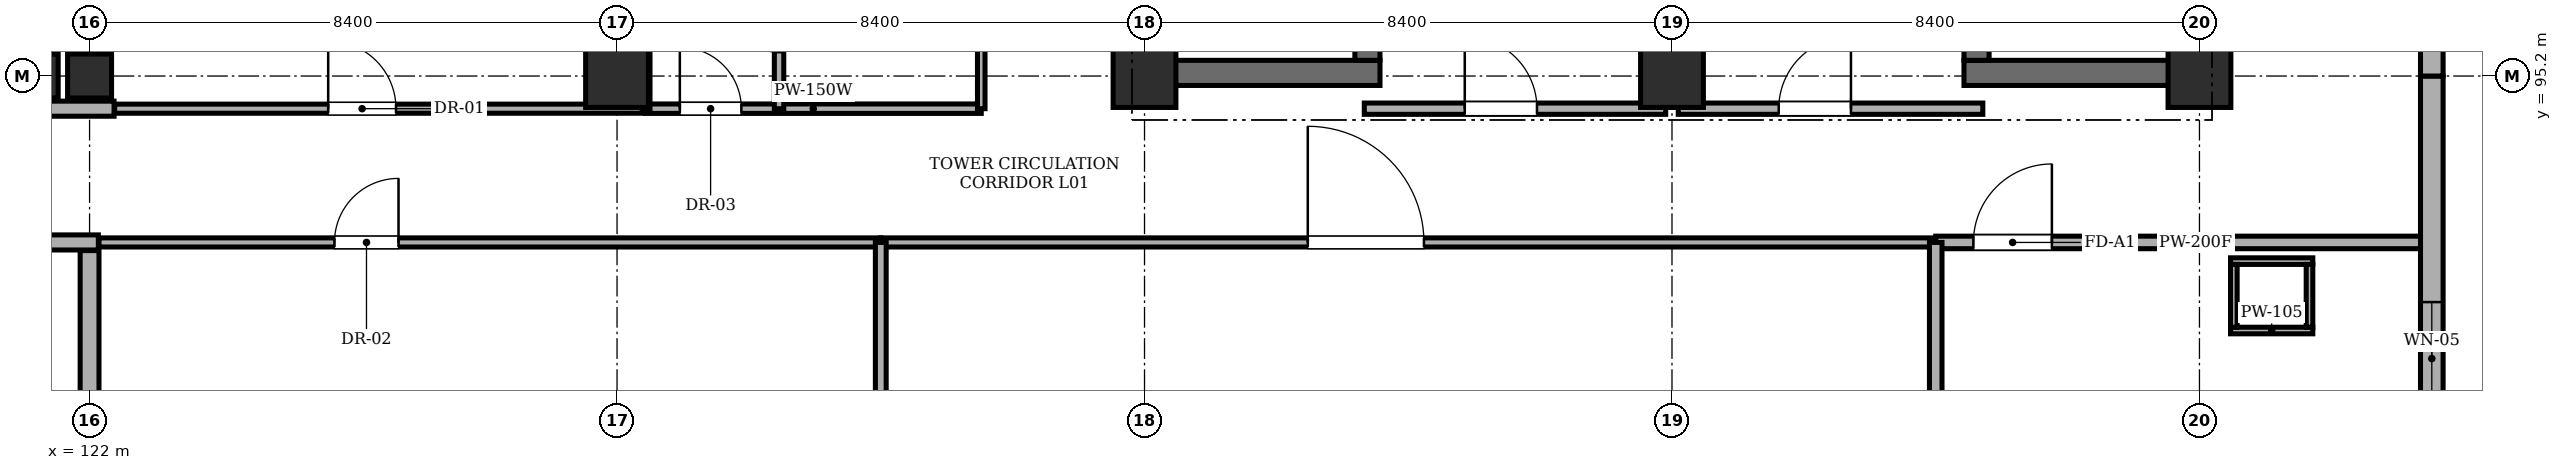
"""IFC4 building model, lengths in metres.
Left out: names, types, materials, properties, quantities, classifications, styles, units other than length and angle.
Written with IfcOpenShell. Run it as: python <this file> out.ifc"""

import sys

from ifc_helpers import new_model, si_unit, direction, frame, frame_2d, origin, origin_2d, place, context, subcontext, project, spatial, rectangle, extrude, element, fill, save


model = new_model("IFC4")
c1 = context("Model", 3, precision=1e-05, world=origin(), true_north=direction((0.0, 1.0)))
c2 = subcontext(c1, "Body", "Model", "MODEL_VIEW")
j1 = project(units=[si_unit("LENGTHUNIT", "METRE"), si_unit("PLANEANGLEUNIT", "RADIAN")], contexts=[c1])
p1 = place(None, origin())
s1 = spatial("IfcSite", under=j1, at=p1, CompositionType="ELEMENT")
p2 = place(p1, origin())
s2 = spatial("IfcBuilding", under=s1, at=p2, CompositionType="ELEMENT")
p3 = place(p2, origin())
s3 = spatial("IfcBuildingStorey", under=s2, at=p3, CompositionType="ELEMENT", Elevation=0.0)
for number, where, z_axis, x_axis in (
    (1, (121.15, 95.2, 0.0), (0.0, 0.0, 1.0), (1.0, 0.0, 0.0)),
    (2, (122.0, 95.2, 0.0), (0.0, 0.0, 1.0), (1.0, 0.0, 0.0)),
):
    element("IfcColumn", number, at=place(p3, frame(where, z_axis=z_axis, x_axis=x_axis)), inside=s3, PredefinedType="COLUMN", context=c2, shape_type="SweptSolid", body=[
        extrude(rectangle(XDim=0.7, YDim=0.7, at=origin_2d()), origin(), (0.0, 0.0, 1.0), 5.18),
    ])
for number, where, z_axis, x_axis in (
    (3, (130.4, 95.2, 0.0), (0.0, 0.0, 1.0), (1.0, 0.0, 0.0)),
    (4, (138.8, 95.2, 0.0), (0.0, 0.0, 1.0), (1.0, 0.0, 0.0)),
    (5, (147.2, 95.2, 0.0), (0.0, 0.0, 1.0), (1.0, 0.0, 0.0)),
    (6, (155.6, 95.2, 0.0), (0.0, 0.0, 1.0), (1.0, 0.0, 0.0)),
):
    element("IfcColumn", number, at=place(p3, frame(where, z_axis=z_axis, x_axis=x_axis)), inside=s3, PredefinedType="COLUMN", context=c2, shape_type="SweptSolid", body=[
        extrude(rectangle(XDim=1.0, YDim=1.0, at=origin_2d()), origin(), (0.0, 0.0, 1.0), 5.18),
    ])
p4 = place(p3, frame((138.65, 95.25, 0.0), z_axis=(0.0, 0.0, 1.0), x_axis=(1.0, 0.0, 0.0)))
e7 = element("IfcWall", 7, at=p4, inside=s3, PredefinedType="SHEAR", context=c2, shape_type="SweptSolid", body=[
    extrude(rectangle(XDim=3.9, YDim=0.4, at=frame_2d((1.95, 0.0))), origin(), (0.0, 0.0, 1.0), 5.18),
])
p5 = place(p3, frame((138.85, 95.45, 0.0), z_axis=(0.0, 0.0, 1.0), x_axis=(0.0, 1.0, 0.0)))
e8 = element("IfcWall", 8, at=p5, inside=s3, PredefinedType="SHEAR", context=c2, shape_type="SweptSolid", body=[
    extrude(rectangle(XDim=7.9, YDim=0.4, at=frame_2d((3.95, 0.0))), origin(), (0.0, 0.0, 1.0), 5.18),
])
p6 = place(p3, frame((142.35, 95.45, 0.0), z_axis=(0.0, 0.0, 1.0), x_axis=(0.0, 1.0, 0.0)))
e9 = element("IfcWall", 9, at=p6, inside=s3, PredefinedType="SHEAR", context=c2, shape_type="SweptSolid", body=[
    extrude(rectangle(XDim=7.9, YDim=0.4, at=frame_2d((3.95, 0.0))), origin(), (0.0, 0.0, 1.0), 5.18),
])
p7 = place(p6, frame((0.22, 0.0, 0.0)))
e10 = element("IfcOpeningElement", 10, at=p7, cuts=e9, PredefinedType="OPENING", context=c2, shape_type="SweptSolid", body=[
    extrude(rectangle(XDim=1.15, YDim=2.15, at=frame_2d((0.575, 1.075))), frame((0.0, 0.21, 0.0), z_axis=(0.0, -1.0, 0.0), x_axis=(1.0, 0.0, 0.0)), (0.0, 0.0, 1.0), 0.42),
])
p8 = place(p3, frame((151.85, 95.25, 0.0), z_axis=(0.0, 0.0, 1.0), x_axis=(1.0, 0.0, 0.0)))
e11 = element("IfcWall", 11, at=p8, inside=s3, PredefinedType="SHEAR", context=c2, shape_type="SweptSolid", body=[
    extrude(rectangle(XDim=3.9, YDim=0.4, at=frame_2d((1.95, 0.0))), origin(), (0.0, 0.0, 1.0), 5.18),
])
p9 = place(p3, frame((152.05, 95.45, 0.0), z_axis=(0.0, 0.0, 1.0), x_axis=(0.0, 1.0, 0.0)))
e12 = element("IfcWall", 12, at=p9, inside=s3, PredefinedType="SHEAR", context=c2, shape_type="SweptSolid", body=[
    extrude(rectangle(XDim=7.9, YDim=0.4, at=frame_2d((3.95, 0.0))), origin(), (0.0, 0.0, 1.0), 5.18),
])
p10 = place(p9, frame((0.35, 0.0, 0.0)))
e13 = element("IfcOpeningElement", 13, at=p10, cuts=e12, PredefinedType="OPENING", context=c2, shape_type="SweptSolid", body=[
    extrude(rectangle(XDim=1.15, YDim=2.15, at=frame_2d((0.575, 1.075))), frame((0.0, 0.21, 0.0), z_axis=(0.0, -1.0, 0.0), x_axis=(1.0, 0.0, 0.0)), (0.0, 0.0, 1.0), 0.42),
])
p11 = place(p3, frame((155.55, 95.45, 0.0), z_axis=(0.0, 0.0, 1.0), x_axis=(0.0, 1.0, 0.0)))
e14 = element("IfcWall", 14, at=p11, inside=s3, PredefinedType="SHEAR", context=c2, shape_type="SweptSolid", body=[
    extrude(rectangle(XDim=7.9, YDim=0.4, at=frame_2d((3.95, 0.0))), origin(), (0.0, 0.0, 1.0), 5.18),
])
p12 = place(p3, frame((159.3, 95.2, 0.0), z_axis=(0.0, 0.0, 1.0), x_axis=(0.0, -1.0, 0.0)))
e15 = element("IfcWall", 15, at=p12, inside=s3, PredefinedType="STANDARD", context=c2, shape_type="SweptSolid", body=[
    extrude(rectangle(XDim=8.4, YDim=0.36, at=frame_2d((4.2, 0.0))), origin(), (0.0, 0.0, 1.0), 4.78),
])
p13 = place(p12, frame((3.6, 0.0, 1.1)))
e16 = element("IfcOpeningElement", 16, at=p13, cuts=e15, PredefinedType="OPENING", context=c2, shape_type="SweptSolid", body=[
    extrude(rectangle(XDim=1.8, YDim=1.8, at=frame_2d((0.9, 0.9))), frame((0.0, 0.19, 0.0), z_axis=(0.0, -1.0, 0.0), x_axis=(1.0, 0.0, 0.0)), (0.0, 0.0, 1.0), 0.38),
])
p14 = place(p3, frame((159.3, 103.6, 0.0), z_axis=(0.0, 0.0, 1.0), x_axis=(0.0, -1.0, 0.0)))
e17 = element("IfcWall", 17, at=p14, inside=s3, PredefinedType="STANDARD", context=c2, shape_type="SweptSolid", body=[
    extrude(rectangle(XDim=8.4, YDim=0.36, at=frame_2d((4.2, 0.0))), origin(), (0.0, 0.0, 1.0), 4.78),
])
p15 = place(p14, frame((1.15, 0.0, 1.1)))
e18 = element("IfcOpeningElement", 18, at=p15, cuts=e17, PredefinedType="OPENING", context=c2, shape_type="SweptSolid", body=[
    extrude(rectangle(XDim=1.4, YDim=1.4, at=frame_2d((0.7, 0.7))), frame((0.0, 0.19, 0.0), z_axis=(0.0, -1.0, 0.0), x_axis=(1.0, 0.0, 0.0)), (0.0, 0.0, 1.0), 0.38),
])
p16 = place(p3, frame((122.0, 87.15, 0.0), z_axis=(0.0, 0.0, 1.0), x_axis=(0.0, 1.0, 0.0)))
e19 = element("IfcWall", 19, at=p16, inside=s3, PredefinedType="STANDARD", context=c2, shape_type="SweptSolid", body=[
    extrude(rectangle(XDim=5.27, YDim=0.3, at=frame_2d((2.635, 0.0))), origin(), (0.0, 0.0, 1.0), 4.43),
])
p17 = place(p3, frame((122.14, 92.55, 0.0), z_axis=(0.0, 0.0, 1.0), x_axis=(-1.0, 0.0, 0.0)))
e20 = element("IfcWall", 20, at=p17, inside=s3, PredefinedType="STANDARD", context=c2, shape_type="SweptSolid", body=[
    extrude(rectangle(XDim=1.11, YDim=0.24, at=frame_2d((0.555, 0.0))), origin(), (0.0, 0.0, 1.0), 5.18),
])
p18 = place(p3, frame((121.03, 94.68, 0.0), z_axis=(0.0, 0.0, 1.0), x_axis=(1.0, 0.0, 0.0)))
e21 = element("IfcWall", 21, at=p18, inside=s3, PredefinedType="STANDARD", context=c2, shape_type="SweptSolid", body=[
    extrude(rectangle(XDim=1.36, YDim=0.24, at=frame_2d((0.68, 0.0))), origin(), (0.0, 0.0, 1.0), 5.18),
])
p19 = place(p3, frame((122.0, 95.55, 0.0), z_axis=(0.0, 0.0, 1.0), x_axis=(0.0, 1.0, 0.0)))
e22 = element("IfcWall", 22, at=p19, inside=s3, PredefinedType="STANDARD", context=c2, shape_type="SweptSolid", body=[
    extrude(rectangle(XDim=7.7, YDim=0.3, at=frame_2d((3.85, 0.0))), origin(), (0.0, 0.0, 1.0), 4.43),
])
p20 = place(p3, frame((142.3, 94.68, 0.0), z_axis=(0.0, 0.0, 1.0), x_axis=(1.0, 0.0, 0.0)))
e23 = element("IfcWall", 23, at=p20, inside=s3, PredefinedType="STANDARD", context=c2, shape_type="SweptSolid", body=[
    extrude(rectangle(XDim=4.8, YDim=0.18, at=frame_2d((2.4, 0.0))), origin(), (0.0, 0.0, 1.0), 5.18),
])
p21 = place(p20, frame((1.6, 0.0, 0.0)))
e24 = element("IfcOpeningElement", 24, at=p21, cuts=e23, PredefinedType="OPENING", context=c2, shape_type="SweptSolid", body=[
    extrude(rectangle(XDim=1.15, YDim=2.15, at=frame_2d((0.575, 1.075))), frame((0.0, 0.1, 0.0), z_axis=(0.0, -1.0, 0.0), x_axis=(1.0, 0.0, 0.0)), (0.0, 0.0, 1.0), 0.2),
])
p22 = place(p3, frame((147.3, 94.68, 0.0), z_axis=(0.0, 0.0, 1.0), x_axis=(1.0, 0.0, 0.0)))
e25 = element("IfcWall", 25, at=p22, inside=s3, PredefinedType="STANDARD", context=c2, shape_type="SweptSolid", body=[
    extrude(rectangle(XDim=4.85, YDim=0.18, at=frame_2d((2.425, 0.0))), origin(), (0.0, 0.0, 1.0), 5.18),
])
p23 = place(p22, frame((1.6, 0.0, 0.0)))
e26 = element("IfcOpeningElement", 26, at=p23, cuts=e25, PredefinedType="OPENING", context=c2, shape_type="SweptSolid", body=[
    extrude(rectangle(XDim=1.15, YDim=2.15, at=frame_2d((0.575, 1.075))), frame((0.0, 0.1, 0.0), z_axis=(0.0, -1.0, 0.0), x_axis=(1.0, 0.0, 0.0)), (0.0, 0.0, 1.0), 0.2),
])
p24 = place(p3, frame((130.85, 94.68, 0.0), z_axis=(0.0, 0.0, 1.0), x_axis=(1.0, 0.0, 0.0)))
e27 = element("IfcWall", 27, at=p24, inside=s3, PredefinedType="PARTITIONING", context=c2, shape_type="SweptSolid", body=[
    extrude(rectangle(XDim=5.35, YDim=0.15, at=frame_2d((2.675, 0.0))), origin(), (0.0, 0.0, 1.0), 5.18),
])
p25 = place(p24, frame((0.55, 0.0, 0.0)))
e28 = element("IfcOpeningElement", 28, at=p25, cuts=e27, PredefinedType="OPENING", context=c2, shape_type="SweptSolid", body=[
    extrude(rectangle(XDim=0.98, YDim=2.12, at=frame_2d((0.49, 1.06))), frame((0.0, 0.085, 0.0), z_axis=(0.0, -1.0, 0.0), x_axis=(1.0, 0.0, 0.0)), (0.0, 0.0, 1.0), 0.17),
])
p26 = place(p3, frame((132.98, 94.68, 0.0), z_axis=(0.0, 0.0, 1.0), x_axis=(0.0, 1.0, 0.0)))
e29 = element("IfcWall", 29, at=p26, inside=s3, PredefinedType="PARTITIONING", context=c2, shape_type="SweptSolid", body=[
    extrude(rectangle(XDim=8.57, YDim=0.15, at=frame_2d((4.285, 0.0))), origin(), (0.0, 0.0, 1.0), 5.18),
])
p27 = place(p26, frame((0.9, 0.0, 0.0)))
e30 = element("IfcOpeningElement", 30, at=p27, cuts=e29, PredefinedType="OPENING", context=c2, shape_type="SweptSolid", body=[
    extrude(rectangle(XDim=1.0, YDim=2.12, at=frame_2d((0.5, 1.06))), frame((0.0, 0.085, 0.0), z_axis=(0.0, -1.0, 0.0), x_axis=(1.0, 0.0, 0.0)), (0.0, 0.0, 1.0), 0.17),
])
p28 = place(p26, frame((3.7, 0.0, 0.0)))
e31 = element("IfcOpeningElement", 31, at=p28, cuts=e29, PredefinedType="OPENING", context=c2, shape_type="SweptSolid", body=[
    extrude(rectangle(XDim=0.92, YDim=2.1, at=frame_2d((0.46, 1.05))), frame((0.0, 0.085, 0.0), z_axis=(0.0, -1.0, 0.0), x_axis=(1.0, 0.0, 0.0)), (0.0, 0.0, 1.0), 0.17),
])
p29 = place(p26, frame((6.5, 0.0, 0.0)))
e32 = element("IfcOpeningElement", 32, at=p29, cuts=e29, PredefinedType="OPENING", context=c2, shape_type="SweptSolid", body=[
    extrude(rectangle(XDim=0.92, YDim=2.1, at=frame_2d((0.46, 1.05))), frame((0.0, 0.085, 0.0), z_axis=(0.0, -1.0, 0.0), x_axis=(1.0, 0.0, 0.0)), (0.0, 0.0, 1.0), 0.17),
])
p30 = place(p3, frame((130.85, 94.68, 0.0), z_axis=(0.0, 0.0, 1.0), x_axis=(0.0, 1.0, 0.0)))
e33 = element("IfcWall", 33, at=p30, inside=s3, PredefinedType="PARTITIONING", context=c2, shape_type="SweptSolid", body=[
    extrude(rectangle(XDim=8.57, YDim=0.15, at=frame_2d((4.285, 0.0))), origin(), (0.0, 0.0, 1.0), 5.18),
])
p31 = place(p3, frame((136.2, 94.68, 0.0), z_axis=(0.0, 0.0, 1.0), x_axis=(0.0, 1.0, 0.0)))
e34 = element("IfcWall", 34, at=p31, inside=s3, PredefinedType="PARTITIONING", context=c2, shape_type="SweptSolid", body=[
    extrude(rectangle(XDim=9.07, YDim=0.12, at=frame_2d((4.535, 0.0))), origin(), (0.0, 0.0, 1.0), 5.18),
])
p32 = place(p3, frame((122.4, 94.68, 0.0), z_axis=(0.0, 0.0, 1.0), x_axis=(1.0, 0.0, 0.0)))
e35 = element("IfcWall", 35, at=p32, inside=s3, PredefinedType="PARTITIONING", context=c2, shape_type="SweptSolid", body=[
    extrude(rectangle(XDim=8.4, YDim=0.145, at=frame_2d((4.2, 0.0))), origin(), (0.0, 0.0, 1.0), 5.18),
])
p33 = place(p32, frame((3.4, 0.0, 0.0)))
e36 = element("IfcOpeningElement", 36, at=p33, cuts=e35, PredefinedType="OPENING", context=c2, shape_type="SweptSolid", body=[
    extrude(rectangle(XDim=1.08, YDim=2.15, at=frame_2d((0.54, 1.075))), frame((0.0, 0.083, 0.0), z_axis=(0.0, -1.0, 0.0), x_axis=(1.0, 0.0, 0.0)), (0.0, 0.0, 1.0), 0.165),
])
p34 = place(p3, frame((122.15, 92.55, 0.0), z_axis=(0.0, 0.0, 1.0), x_axis=(1.0, 0.0, 0.0)))
e37 = element("IfcWall", 37, at=p34, inside=s3, PredefinedType="PARTITIONING", context=c2, shape_type="SweptSolid", body=[
    extrude(rectangle(XDim=12.45, YDim=0.145, at=frame_2d((6.225, 0.0))), origin(), (0.0, 0.0, 1.0), 5.18),
])
p35 = place(p34, frame((3.75, 0.0, 0.0)))
e38 = element("IfcOpeningElement", 38, at=p35, cuts=e37, PredefinedType="OPENING", context=c2, shape_type="SweptSolid", body=[
    extrude(rectangle(XDim=1.02, YDim=2.15, at=frame_2d((0.51, 1.075))), frame((0.0, 0.083, 0.0), z_axis=(0.0, -1.0, 0.0), x_axis=(1.0, 0.0, 0.0)), (0.0, 0.0, 1.0), 0.165),
])
p36 = place(p3, frame((134.6, 92.55, 0.0), z_axis=(0.0, 0.0, 1.0), x_axis=(1.0, 0.0, 0.0)))
e39 = element("IfcWall", 39, at=p36, inside=s3, PredefinedType="PARTITIONING", context=c2, shape_type="SweptSolid", body=[
    extrude(rectangle(XDim=16.8, YDim=0.145, at=frame_2d((8.4, 0.0))), origin(), (0.0, 0.0, 1.0), 5.18),
])
p37 = place(p36, frame((6.8, 0.0, 0.0)))
e40 = element("IfcOpeningElement", 40, at=p37, cuts=e39, PredefinedType="OPENING", context=c2, shape_type="SweptSolid", body=[
    extrude(rectangle(XDim=1.85, YDim=2.25, at=frame_2d((0.925, 1.125))), frame((0.0, 0.083, 0.0), z_axis=(0.0, -1.0, 0.0), x_axis=(1.0, 0.0, 0.0)), (0.0, 0.0, 1.0), 0.165),
])
p38 = place(p3, frame((134.6, 78.55, 0.0), z_axis=(0.0, 0.0, 1.0), x_axis=(0.0, 1.0, 0.0)))
e41 = element("IfcWall", 41, at=p38, inside=s3, PredefinedType="PARTITIONING", context=c2, shape_type="SweptSolid", body=[
    extrude(rectangle(XDim=14.0, YDim=0.172, at=frame_2d((7.0, 0.0))), origin(), (0.0, 0.0, 1.0), 4.63),
])
p39 = place(p3, frame((151.4, 92.55, 0.0), z_axis=(0.0, 0.0, 1.0), x_axis=(1.0, 0.0, 0.0)))
e42 = element("IfcWall", 42, at=p39, inside=s3, PredefinedType="SOLIDWALL", context=c2, shape_type="SweptSolid", body=[
    extrude(rectangle(XDim=7.72, YDim=0.2, at=frame_2d((3.86, 0.0))), origin(), (0.0, 0.0, 1.0), 5.18),
])
p40 = place(p39, frame((0.6, 0.0, 0.0)))
e43 = element("IfcOpeningElement", 43, at=p40, cuts=e42, PredefinedType="OPENING", context=c2, shape_type="SweptSolid", body=[
    extrude(rectangle(XDim=1.25, YDim=2.2, at=frame_2d((0.625, 1.1))), frame((0.0, 0.11, 0.0), z_axis=(0.0, -1.0, 0.0), x_axis=(1.0, 0.0, 0.0)), (0.0, 0.0, 1.0), 0.22),
])
p41 = place(p3, frame((151.4, 78.55, 0.0), z_axis=(0.0, 0.0, 1.0), x_axis=(0.0, 1.0, 0.0)))
e44 = element("IfcWall", 44, at=p41, inside=s3, PredefinedType="SOLIDWALL", context=c2, shape_type="SweptSolid", body=[
    extrude(rectangle(XDim=14.0, YDim=0.2, at=frame_2d((7.0, 0.0))), origin(), (0.0, 0.0, 1.0), 4.78),
])
for number, where, z_axis, x_axis in (
    (45, (156.095, 91.147, 0.0), (0.0, 0.0, 1.0), (1.0, 0.0, 0.0)),
    (46, (156.095, 92.252, 0.0), (0.0, 0.0, 1.0), (1.0, 0.0, 0.0)),
):
    element("IfcWall", number, at=place(p3, frame(where, z_axis=z_axis, x_axis=x_axis)), inside=s3, PredefinedType="PARTITIONING", context=c2, shape_type="SweptSolid", body=[
        extrude(rectangle(XDim=1.31, YDim=0.105, at=frame_2d((0.655, 0.0))), origin(), (0.0, 0.0, 1.0), 5.18),
    ])
for number, where, z_axis, x_axis in (
    (47, (156.147, 91.2, 0.0), (0.0, 0.0, 1.0), (0.0, 1.0, 0.0)),
    (48, (157.353, 91.2, 0.0), (0.0, 0.0, 1.0), (0.0, 1.0, 0.0)),
):
    element("IfcWall", number, at=place(p3, frame(where, z_axis=z_axis, x_axis=x_axis)), inside=s3, PredefinedType="PARTITIONING", context=c2, shape_type="SweptSolid", body=[
        extrude(rectangle(XDim=1.0, YDim=0.105, at=frame_2d((0.5, 0.0))), origin(), (0.0, 0.0, 1.0), 5.18),
    ])
p42 = place(p13, origin())
e49 = element("IfcWindow", 49, at=p42, inside=s3, PartitioningType="DOUBLE_PANEL_VERTICAL", PredefinedType="WINDOW", context=c2, shape_type="SweptSolid", body=[
    extrude(rectangle(XDim=1.8, YDim=1.8, at=frame_2d((0.9, 0.9))), frame((0.0, 0.03, 0.0), z_axis=(0.0, -1.0, 0.0), x_axis=(1.0, 0.0, 0.0)), (0.0, 0.0, 1.0), 0.06),
])
fill(e16, e49)
p43 = place(p21, origin())
e50 = element("IfcDoor", 50, at=p43, inside=s3, OperationType="SINGLE_SWING_LEFT", PredefinedType="DOOR", context=c2, shape_type="SweptSolid", body=[
    extrude(rectangle(XDim=1.15, YDim=2.15, at=frame_2d((0.575, 1.075))), frame((0.0, 0.025, 0.0), z_axis=(0.0, -1.0, 0.0), x_axis=(1.0, 0.0, 0.0)), (0.0, 0.0, 1.0), 0.05),
])
fill(e24, e50)
p44 = place(p23, origin())
e51 = element("IfcDoor", 51, at=p44, inside=s3, OperationType="SINGLE_SWING_RIGHT", PredefinedType="DOOR", context=c2, shape_type="SweptSolid", body=[
    extrude(rectangle(XDim=1.15, YDim=2.15, at=frame_2d((0.575, 1.075))), frame((0.0, 0.025, 0.0), z_axis=(0.0, -1.0, 0.0), x_axis=(1.0, 0.0, 0.0)), (0.0, 0.0, 1.0), 0.05),
])
fill(e26, e51)
p45 = place(p25, origin())
e52 = element("IfcDoor", 52, at=p45, inside=s3, OperationType="SINGLE_SWING_LEFT", PredefinedType="DOOR", context=c2, shape_type="SweptSolid", body=[
    extrude(rectangle(XDim=0.98, YDim=2.12, at=frame_2d((0.49, 1.06))), frame((0.0, 0.025, 0.0), z_axis=(0.0, -1.0, 0.0), x_axis=(1.0, 0.0, 0.0)), (0.0, 0.0, 1.0), 0.05),
])
fill(e28, e52)
p46 = place(p27, origin())
e53 = element("IfcDoor", 53, at=p46, inside=s3, OperationType="SINGLE_SWING_RIGHT", PredefinedType="DOOR", context=c2, shape_type="SweptSolid", body=[
    extrude(rectangle(XDim=1.0, YDim=2.12, at=frame_2d((0.5, 1.06))), frame((0.0, 0.025, 0.0), z_axis=(0.0, -1.0, 0.0), x_axis=(1.0, 0.0, 0.0)), (0.0, 0.0, 1.0), 0.05),
])
fill(e30, e53)
p47 = place(p33, origin())
e54 = element("IfcDoor", 54, at=p47, inside=s3, OperationType="SINGLE_SWING_LEFT", PredefinedType="DOOR", context=c2, shape_type="SweptSolid", body=[
    extrude(rectangle(XDim=1.08, YDim=2.15, at=frame_2d((0.54, 1.075))), frame((0.0, 0.025, 0.0), z_axis=(0.0, -1.0, 0.0), x_axis=(1.0, 0.0, 0.0)), (0.0, 0.0, 1.0), 0.05),
])
fill(e36, e54)
p48 = place(p35, origin())
e55 = element("IfcDoor", 55, at=p48, inside=s3, OperationType="SINGLE_SWING_RIGHT", PredefinedType="DOOR", context=c2, shape_type="SweptSolid", body=[
    extrude(rectangle(XDim=1.02, YDim=2.15, at=frame_2d((0.51, 1.075))), frame((0.0, 0.025, 0.0), z_axis=(0.0, -1.0, 0.0), x_axis=(1.0, 0.0, 0.0)), (0.0, 0.0, 1.0), 0.05),
])
fill(e38, e55)
p49 = place(p37, origin())
e56 = element("IfcDoor", 56, at=p49, inside=s3, OperationType="SINGLE_SWING_LEFT", PredefinedType="DOOR", context=c2, shape_type="SweptSolid", body=[
    extrude(rectangle(XDim=1.85, YDim=2.25, at=frame_2d((0.925, 1.125))), frame((0.0, 0.025, 0.0), z_axis=(0.0, -1.0, 0.0), x_axis=(1.0, 0.0, 0.0)), (0.0, 0.0, 1.0), 0.05),
])
fill(e40, e56)
p50 = place(p40, origin())
e57 = element("IfcDoor", 57, at=p50, inside=s3, OperationType="SINGLE_SWING_RIGHT", PredefinedType="DOOR", context=c2, shape_type="SweptSolid", body=[
    extrude(rectangle(XDim=1.25, YDim=2.2, at=frame_2d((0.625, 1.1))), frame((0.0, 0.025, 0.0), z_axis=(0.0, -1.0, 0.0), x_axis=(1.0, 0.0, 0.0)), (0.0, 0.0, 1.0), 0.05),
])
fill(e43, e57)
save(model, sys.argv[1])
